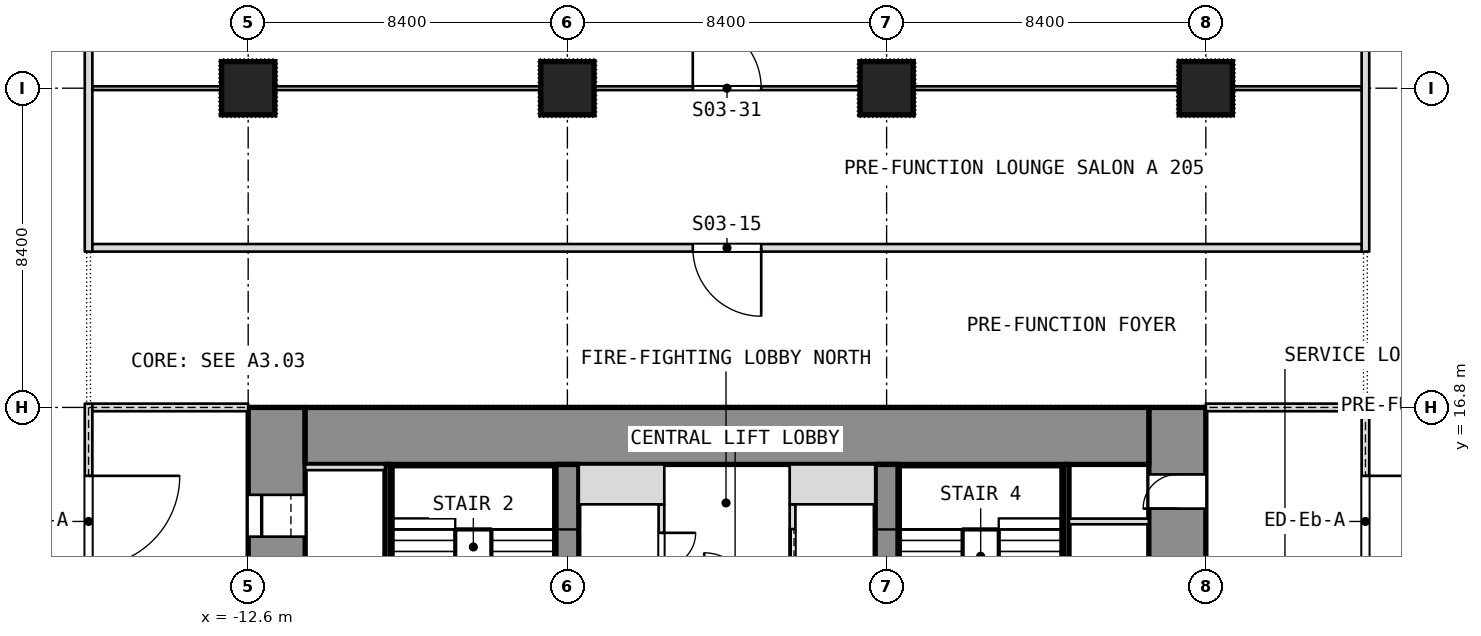
"""IFC4 building model, lengths in metres.
Left out: names, types, materials, properties, quantities, classifications, styles, units other than length and angle.
Written with IfcOpenShell. Run it as: python <this file> out.ifc"""

import sys

from ifc_helpers import new_model, si_unit, direction, frame, frame_2d, origin, origin_2d, place, context, subcontext, project, spatial, rectangle, extrude, element, fill, save


model = new_model("IFC4")
c1 = context("Model", 3, precision=1e-05, world=origin(), true_north=direction((0.0, 1.0)))
c2 = subcontext(c1, "Body", "Model", "MODEL_VIEW")
j1 = project(units=[si_unit("LENGTHUNIT", "METRE"), si_unit("PLANEANGLEUNIT", "RADIAN")], contexts=[c1])
p1 = place(None, origin())
s1 = spatial("IfcSite", under=j1, at=p1, CompositionType="ELEMENT")
p2 = place(p1, origin())
s2 = spatial("IfcBuilding", under=s1, at=p2, CompositionType="ELEMENT")
p3 = place(p2, frame((0.0, 0.0, 13.0)))
s3 = spatial("IfcBuildingStorey", under=s2, at=p3, CompositionType="ELEMENT", Elevation=13.0)
for number, where, z_axis, x_axis in (
    (1, (-12.6, 25.2, 0.0), (0.0, 0.0, 1.0), (1.0, 0.0, 0.0)),
    (2, (-4.2, 25.2, 0.0), (0.0, 0.0, 1.0), (1.0, 0.0, 0.0)),
    (3, (4.2, 25.2, 0.0), (0.0, 0.0, 1.0), (1.0, 0.0, 0.0)),
    (4, (12.6, 25.2, 0.0), (0.0, 0.0, 1.0), (1.0, 0.0, 0.0)),
):
    element("IfcColumn", number, at=place(p3, frame(where, z_axis=z_axis, x_axis=x_axis)), inside=s3, PredefinedType="COLUMN", context=c2, shape_type="SweptSolid", body=[
        extrude(rectangle(XDim=1.4, YDim=1.4, at=origin_2d()), origin(), (0.0, 0.0, 1.0), 8.0),
    ])
p4 = place(p3, frame((11.85, 0.0, 0.0), z_axis=(0.0, 0.0, 1.0), x_axis=(0.0, 1.0, 0.0)))
e5 = element("IfcWall", 5, at=p4, inside=s3, PredefinedType="SHEAR", context=c2, shape_type="SweptSolid", body=[
    extrude(rectangle(XDim=16.8, YDim=1.5, at=frame_2d((8.4, 0.0))), origin(), (0.0, 0.0, 1.0), 8.0),
])
p5 = place(p4, frame((1.762, 0.0, 0.0)))
e6 = element("IfcOpeningElement", 6, at=p5, cuts=e5, PredefinedType="OPENING", context=c2, shape_type="SweptSolid", body=[
    extrude(rectangle(XDim=0.9, YDim=2.1, at=frame_2d((0.45, 1.05))), frame((0.0, 0.75, 0.0), z_axis=(0.0, -1.0, 0.0), x_axis=(1.0, 0.0, 0.0)), (0.0, 0.0, 1.0), 1.5),
])
p6 = place(p4, frame((4.387, 0.0, 0.0)))
e7 = element("IfcOpeningElement", 7, at=p6, cuts=e5, PredefinedType="OPENING", context=c2, shape_type="SweptSolid", body=[
    extrude(rectangle(XDim=0.9, YDim=2.1, at=frame_2d((0.45, 1.05))), frame((0.0, 0.75, 0.0), z_axis=(0.0, -1.0, 0.0), x_axis=(1.0, 0.0, 0.0)), (0.0, 0.0, 1.0), 1.5),
])
p7 = place(p4, frame((6.825, 0.0, 0.0)))
e8 = element("IfcOpeningElement", 8, at=p7, cuts=e5, PredefinedType="OPENING", context=c2, shape_type="SweptSolid", body=[
    extrude(rectangle(XDim=1.2, YDim=2.1, at=frame_2d((0.6, 1.05))), frame((0.0, 0.75, 0.0), z_axis=(0.0, -1.0, 0.0), x_axis=(1.0, 0.0, 0.0)), (0.0, 0.0, 1.0), 1.5),
])
p8 = place(p4, frame((14.137, 0.0, 0.0)))
e9 = element("IfcOpeningElement", 9, at=p8, cuts=e5, PredefinedType="OPENING", context=c2, shape_type="SweptSolid", body=[
    extrude(rectangle(XDim=0.9, YDim=2.1, at=frame_2d((0.45, 1.05))), frame((0.0, 0.75, 0.0), z_axis=(0.0, -1.0, 0.0), x_axis=(1.0, 0.0, 0.0)), (0.0, 0.0, 1.0), 1.5),
])
p9 = place(p4, frame((11.512, 0.0, 0.0)))
e10 = element("IfcOpeningElement", 10, at=p9, cuts=e5, PredefinedType="OPENING", context=c2, shape_type="SweptSolid", body=[
    extrude(rectangle(XDim=0.9, YDim=2.1, at=frame_2d((0.45, 1.05))), frame((0.0, 0.75, 0.0), z_axis=(0.0, -1.0, 0.0), x_axis=(1.0, 0.0, 0.0)), (0.0, 0.0, 1.0), 1.5),
])
p10 = place(p4, frame((8.775, 0.0, 0.0)))
e11 = element("IfcOpeningElement", 11, at=p10, cuts=e5, PredefinedType="OPENING", context=c2, shape_type="SweptSolid", body=[
    extrude(rectangle(XDim=1.2, YDim=2.1, at=frame_2d((0.6, 1.05))), frame((0.0, 0.75, 0.0), z_axis=(0.0, -1.0, 0.0), x_axis=(1.0, 0.0, 0.0)), (0.0, 0.0, 1.0), 1.5),
])
p11 = place(p3, frame((-11.85, 0.0, 0.0), z_axis=(0.0, 0.0, 1.0), x_axis=(0.0, 1.0, 0.0)))
e12 = element("IfcWall", 12, at=p11, inside=s3, PredefinedType="SHEAR", context=c2, shape_type="SweptSolid", body=[
    extrude(rectangle(XDim=16.8, YDim=1.5, at=frame_2d((8.4, 0.0))), origin(), (0.0, 0.0, 1.0), 8.0),
])
p12 = place(p11, frame((2.3, 0.0, 0.0)))
e13 = element("IfcOpeningElement", 13, at=p12, cuts=e12, PredefinedType="OPENING", context=c2, shape_type="SweptSolid", body=[
    extrude(rectangle(XDim=1.1, YDim=2.1, at=frame_2d((0.55, 1.05))), frame((0.0, 0.75, 0.0), z_axis=(0.0, -1.0, 0.0), x_axis=(1.0, 0.0, 0.0)), (0.0, 0.0, 1.0), 1.5),
])
p13 = place(p11, frame((4.85, 0.0, 0.0)))
e14 = element("IfcOpeningElement", 14, at=p13, cuts=e12, PredefinedType="OPENING", context=c2, shape_type="SweptSolid", body=[
    extrude(rectangle(XDim=1.1, YDim=2.1, at=frame_2d((0.55, 1.05))), frame((0.0, 0.75, 0.0), z_axis=(0.0, -1.0, 0.0), x_axis=(1.0, 0.0, 0.0)), (0.0, 0.0, 1.0), 1.5),
])
p14 = place(p11, frame((6.825, 0.0, 0.0)))
e15 = element("IfcOpeningElement", 15, at=p14, cuts=e12, PredefinedType="OPENING", context=c2, shape_type="SweptSolid", body=[
    extrude(rectangle(XDim=1.2, YDim=2.1, at=frame_2d((0.6, 1.05))), frame((0.0, 0.75, 0.0), z_axis=(0.0, -1.0, 0.0), x_axis=(1.0, 0.0, 0.0)), (0.0, 0.0, 1.0), 1.5),
])
p15 = place(p11, frame((13.4, 0.0, 0.0)))
e16 = element("IfcOpeningElement", 16, at=p15, cuts=e12, PredefinedType="OPENING", context=c2, shape_type="SweptSolid", body=[
    extrude(rectangle(XDim=1.1, YDim=2.1, at=frame_2d((0.55, 1.05))), frame((0.0, 0.75, 0.0), z_axis=(0.0, -1.0, 0.0), x_axis=(1.0, 0.0, 0.0)), (0.0, 0.0, 1.0), 1.5),
])
p16 = place(p11, frame((10.85, 0.0, 0.0)))
e17 = element("IfcOpeningElement", 17, at=p16, cuts=e12, PredefinedType="OPENING", context=c2, shape_type="SweptSolid", body=[
    extrude(rectangle(XDim=1.1, YDim=2.1, at=frame_2d((0.55, 1.05))), frame((0.0, 0.75, 0.0), z_axis=(0.0, -1.0, 0.0), x_axis=(1.0, 0.0, 0.0)), (0.0, 0.0, 1.0), 1.5),
])
p17 = place(p11, frame((8.775, 0.0, 0.0)))
e18 = element("IfcOpeningElement", 18, at=p17, cuts=e12, PredefinedType="OPENING", context=c2, shape_type="SweptSolid", body=[
    extrude(rectangle(XDim=1.2, YDim=2.1, at=frame_2d((0.6, 1.05))), frame((0.0, 0.75, 0.0), z_axis=(0.0, -1.0, 0.0), x_axis=(1.0, 0.0, 0.0)), (0.0, 0.0, 1.0), 1.5),
])
p18 = place(p3, frame((-11.1, 16.05, 0.0), z_axis=(0.0, 0.0, 1.0), x_axis=(1.0, 0.0, 0.0)))
e19 = element("IfcWall", 19, at=p18, inside=s3, PredefinedType="SHEAR", context=c2, shape_type="SweptSolid", body=[
    extrude(rectangle(XDim=22.2, YDim=1.5, at=frame_2d((11.1, 0.0))), origin(), (0.0, 0.0, 1.0), 8.0),
])
p19 = place(p3, frame((-4.2, 1.5, 0.0), z_axis=(0.0, 0.0, 1.0), x_axis=(0.0, 1.0, 0.0)))
e20 = element("IfcWall", 20, at=p19, inside=s3, PredefinedType="SHEAR", context=c2, shape_type="SweptSolid", body=[
    extrude(rectangle(XDim=13.8, YDim=0.6, at=frame_2d((6.9, 0.0))), origin(), (0.0, 0.0, 1.0), 8.0),
])
p20 = place(p19, frame((7.8, 0.0, 0.0)))
e21 = element("IfcOpeningElement", 21, at=p20, cuts=e20, PredefinedType="OPENING", context=c2, shape_type="SweptSolid", body=[
    extrude(rectangle(XDim=1.2, YDim=2.1, at=frame_2d((0.6, 1.05))), frame((0.0, 0.3, 0.0), z_axis=(0.0, -1.0, 0.0), x_axis=(1.0, 0.0, 0.0)), (0.0, 0.0, 1.0), 0.6),
])
p21 = place(p3, frame((4.2, 1.5, 0.0), z_axis=(0.0, 0.0, 1.0), x_axis=(0.0, 1.0, 0.0)))
e22 = element("IfcWall", 22, at=p21, inside=s3, PredefinedType="SHEAR", context=c2, shape_type="SweptSolid", body=[
    extrude(rectangle(XDim=13.8, YDim=0.6, at=frame_2d((6.9, 0.0))), origin(), (0.0, 0.0, 1.0), 8.0),
])
p22 = place(p21, frame((5.25, 0.0, 0.0)))
e23 = element("IfcOpeningElement", 23, at=p22, cuts=e22, PredefinedType="OPENING", context=c2, shape_type="SweptSolid", body=[
    extrude(rectangle(XDim=1.2, YDim=2.1, at=frame_2d((0.6, 1.05))), frame((0.0, 0.3, 0.0), z_axis=(0.0, -1.0, 0.0), x_axis=(1.0, 0.0, 0.0)), (0.0, 0.0, 1.0), 0.6),
])
p23 = place(p3, frame((16.8, 20.9, 0.0), z_axis=(0.0, 0.0, 1.0), x_axis=(0.0, 1.0, 0.0)))
e24 = element("IfcWall", 24, at=p23, inside=s3, PredefinedType="PARTITIONING", context=c2, shape_type="SweptSolid", body=[
    extrude(rectangle(XDim=15.0, YDim=0.2, at=frame_2d((7.5, 0.0))), origin(), (0.0, 0.0, 1.0), 7.68),
])
p24 = place(p3, frame((-16.8, 20.9, 0.0), z_axis=(0.0, 0.0, 1.0), x_axis=(0.0, 1.0, 0.0)))
e25 = element("IfcWall", 25, at=p24, inside=s3, PredefinedType="PARTITIONING", context=c2, shape_type="SweptSolid", body=[
    extrude(rectangle(XDim=13.8, YDim=0.2, at=frame_2d((6.9, 0.0))), origin(), (0.0, 0.0, 1.0), 7.68),
])
p25 = place(p3, frame((-16.7, 21.0, 0.0), z_axis=(0.0, 0.0, 1.0), x_axis=(1.0, 0.0, 0.0)))
e26 = element("IfcWall", 26, at=p25, inside=s3, PredefinedType="PARTITIONING", context=c2, shape_type="SweptSolid", body=[
    extrude(rectangle(XDim=33.4, YDim=0.2, at=frame_2d((16.7, 0.0))), origin(), (0.0, 0.0, 1.0), 7.68),
])
p26 = place(p25, frame((15.8, 0.0, 0.0)))
e27 = element("IfcOpeningElement", 27, at=p26, cuts=e26, PredefinedType="OPENING", context=c2, shape_type="SweptSolid", body=[
    extrude(rectangle(XDim=1.8, YDim=2.1, at=frame_2d((0.9, 1.05))), frame((0.0, 0.1, 0.0), z_axis=(0.0, -1.0, 0.0), x_axis=(1.0, 0.0, 0.0)), (0.0, 0.0, 1.0), 0.2),
])
p27 = place(p3, frame((-16.7, 25.2, 0.0), z_axis=(0.0, 0.0, 1.0), x_axis=(1.0, 0.0, 0.0)))
e28 = element("IfcWall", 28, at=p27, inside=s3, PredefinedType="PARTITIONING", context=c2, shape_type="SweptSolid", body=[
    extrude(rectangle(XDim=3.38, YDim=0.1, at=frame_2d((1.69, 0.0))), origin(), (0.0, 0.0, 1.0), 7.68),
])
p28 = place(p3, frame((-11.88, 25.2, 0.0), z_axis=(0.0, 0.0, 1.0), x_axis=(1.0, 0.0, 0.0)))
e29 = element("IfcWall", 29, at=p28, inside=s3, PredefinedType="PARTITIONING", context=c2, shape_type="SweptSolid", body=[
    extrude(rectangle(XDim=6.96, YDim=0.1, at=frame_2d((3.48, 0.0))), origin(), (0.0, 0.0, 1.0), 7.68),
])
p29 = place(p3, frame((-3.48, 25.2, 0.0), z_axis=(0.0, 0.0, 1.0), x_axis=(1.0, 0.0, 0.0)))
e30 = element("IfcWall", 30, at=p29, inside=s3, PredefinedType="PARTITIONING", context=c2, shape_type="SweptSolid", body=[
    extrude(rectangle(XDim=6.96, YDim=0.1, at=frame_2d((3.48, 0.0))), origin(), (0.0, 0.0, 1.0), 7.68),
])
p30 = place(p29, frame((2.58, 0.0, 0.0)))
e31 = element("IfcOpeningElement", 31, at=p30, cuts=e30, PredefinedType="OPENING", context=c2, shape_type="SweptSolid", body=[
    extrude(rectangle(XDim=1.8, YDim=2.1, at=frame_2d((0.9, 1.05))), frame((0.0, 0.05, 0.0), z_axis=(0.0, -1.0, 0.0), x_axis=(1.0, 0.0, 0.0)), (0.0, 0.0, 1.0), 0.1),
])
p31 = place(p3, frame((4.92, 25.2, 0.0), z_axis=(0.0, 0.0, 1.0), x_axis=(1.0, 0.0, 0.0)))
e32 = element("IfcWall", 32, at=p31, inside=s3, PredefinedType="PARTITIONING", context=c2, shape_type="SweptSolid", body=[
    extrude(rectangle(XDim=6.96, YDim=0.1, at=frame_2d((3.48, 0.0))), origin(), (0.0, 0.0, 1.0), 7.68),
])
p32 = place(p3, frame((13.32, 25.2, 0.0), z_axis=(0.0, 0.0, 1.0), x_axis=(1.0, 0.0, 0.0)))
e33 = element("IfcWall", 33, at=p32, inside=s3, PredefinedType="PARTITIONING", context=c2, shape_type="SweptSolid", body=[
    extrude(rectangle(XDim=3.38, YDim=0.1, at=frame_2d((1.69, 0.0))), origin(), (0.0, 0.0, 1.0), 7.68),
])
p33 = place(p3, frame((-8.925, 8.7, 0.0), z_axis=(0.0, 0.0, 1.0), x_axis=(0.0, 1.0, 0.0)))
e34 = element("IfcWall", 34, at=p33, inside=s3, PredefinedType="SHEAR", context=c2, shape_type="SweptSolid", body=[
    extrude(rectangle(XDim=6.6, YDim=0.15, at=frame_2d((3.3, 0.0))), origin(), (0.0, 0.0, 1.0), 7.78),
])
p34 = place(p33, frame((0.075, 0.0, 0.0)))
e35 = element("IfcOpeningElement", 35, at=p34, cuts=e34, PredefinedType="OPENING", context=c2, shape_type="SweptSolid", body=[
    extrude(rectangle(XDim=1.2, YDim=2.1, at=frame_2d((0.6, 1.05))), frame((0.0, 0.075, 0.0), z_axis=(0.0, -1.0, 0.0), x_axis=(1.0, 0.0, 0.0)), (0.0, 0.0, 1.0), 0.15),
])
p35 = place(p3, frame((-11.1, 15.225, 0.0), z_axis=(0.0, 0.0, 1.0), x_axis=(1.0, 0.0, 0.0)))
e36 = element("IfcWall", 36, at=p35, inside=s3, PredefinedType="SHEAR", context=c2, shape_type="SweptSolid", body=[
    extrude(rectangle(XDim=2.1, YDim=0.15, at=frame_2d((1.05, 0.0))), origin(), (0.0, 0.0, 1.0), 8.0),
])
p36 = place(p3, frame((8.925, 8.7, 0.0), z_axis=(0.0, 0.0, 1.0), x_axis=(0.0, 1.0, 0.0)))
e37 = element("IfcWall", 37, at=p36, inside=s3, PredefinedType="SHEAR", context=c2, shape_type="SweptSolid", body=[
    extrude(rectangle(XDim=6.6, YDim=0.15, at=frame_2d((3.3, 0.0))), origin(), (0.0, 0.0, 1.0), 7.78),
])
p37 = place(p36, frame((0.075, 0.0, 0.0)))
e38 = element("IfcOpeningElement", 38, at=p37, cuts=e37, PredefinedType="OPENING", context=c2, shape_type="SweptSolid", body=[
    extrude(rectangle(XDim=1.2, YDim=2.1, at=frame_2d((0.6, 1.05))), frame((0.0, 0.075, 0.0), z_axis=(0.0, -1.0, 0.0), x_axis=(1.0, 0.0, 0.0)), (0.0, 0.0, 1.0), 0.15),
])
p38 = place(p3, frame((9.0, 13.8, 0.0), z_axis=(0.0, 0.0, 1.0), x_axis=(1.0, 0.0, 0.0)))
e39 = element("IfcWall", 39, at=p38, inside=s3, PredefinedType="PARTITIONING", context=c2, shape_type="SweptSolid", body=[
    extrude(rectangle(XDim=2.1, YDim=0.15, at=frame_2d((1.05, 0.0))), origin(), (0.0, 0.0, 1.0), 7.78),
])
p39 = place(p3, frame((-1.725, 11.85, 0.0), z_axis=(0.0, 0.0, 1.0), x_axis=(0.0, 1.0, 0.0)))
e40 = element("IfcWall", 40, at=p39, inside=s3, PredefinedType="PARTITIONING", context=c2, shape_type="SweptSolid", body=[
    extrude(rectangle(XDim=2.4, YDim=0.15, at=frame_2d((1.2, 0.0))), origin(), (0.0, 0.0, 1.0), 7.78),
])
p40 = place(p39, frame((0.75, 0.0, 0.0)))
e41 = element("IfcOpeningElement", 41, at=p40, cuts=e40, PredefinedType="OPENING", context=c2, shape_type="SweptSolid", body=[
    extrude(rectangle(XDim=0.9, YDim=2.1, at=frame_2d((0.45, 1.05))), frame((0.0, 0.075, 0.0), z_axis=(0.0, -1.0, 0.0), x_axis=(1.0, 0.0, 0.0)), (0.0, 0.0, 1.0), 0.15),
])
p41 = place(p3, frame((-3.9, 14.775, 0.0), z_axis=(0.0, 0.0, 1.0), x_axis=(1.0, 0.0, 0.0)))
e42 = element("IfcWall", 42, at=p41, inside=s3, PredefinedType="PARTITIONING", context=c2, shape_type="SweptSolid", body=[
    extrude(rectangle(XDim=2.25, YDim=1.05, at=frame_2d((1.125, 0.0))), origin(), (0.0, 0.0, 1.0), 7.78),
])
p42 = place(p3, frame((1.725, 11.85, 0.0), z_axis=(0.0, 0.0, 1.0), x_axis=(0.0, 1.0, 0.0)))
e43 = element("IfcWall", 43, at=p42, inside=s3, PredefinedType="SHEAR", context=c2, shape_type="SweptSolid", body=[
    extrude(rectangle(XDim=2.4, YDim=0.15, at=frame_2d((1.2, 0.0))), origin(), (0.0, 0.0, 1.0), 8.0),
])
p43 = place(p42, frame((0.65, 0.0, 0.0)))
e44 = element("IfcOpeningElement", 44, at=p43, cuts=e43, PredefinedType="OPENING", context=c2, shape_type="SweptSolid", body=[
    extrude(rectangle(XDim=1.1, YDim=2.1, at=frame_2d((0.55, 1.05))), frame((0.0, 0.075, 0.0), z_axis=(0.0, -1.0, 0.0), x_axis=(1.0, 0.0, 0.0)), (0.0, 0.0, 1.0), 0.15),
])
p44 = place(p3, frame((1.65, 14.775, 0.0), z_axis=(0.0, 0.0, 1.0), x_axis=(1.0, 0.0, 0.0)))
e45 = element("IfcWall", 45, at=p44, inside=s3, PredefinedType="SHEAR", context=c2, shape_type="SweptSolid", body=[
    extrude(rectangle(XDim=2.25, YDim=1.05, at=frame_2d((1.125, 0.0))), origin(), (0.0, 0.0, 1.0), 8.0),
])
p45 = place(p3, frame((-16.8, -0.1, 0.0), z_axis=(0.0, 0.0, 1.0), x_axis=(0.0, 1.0, 0.0)))
e46 = element("IfcWall", 46, at=p45, inside=s3, PredefinedType="PARTITIONING", context=c2, shape_type="SweptSolid", body=[
    extrude(rectangle(XDim=17.0, YDim=0.2, at=frame_2d((8.5, 0.0))), origin(), (0.0, 0.0, 1.0), 7.78),
])
p46 = place(p45, frame((1.9, 0.0, 0.0)))
e47 = element("IfcOpeningElement", 47, at=p46, cuts=e46, PredefinedType="OPENING", context=c2, shape_type="SweptSolid", body=[
    extrude(rectangle(XDim=2.4, YDim=2.1, at=frame_2d((1.2, 1.05))), frame((0.0, 0.1, 0.0), z_axis=(0.0, -1.0, 0.0), x_axis=(1.0, 0.0, 0.0)), (0.0, 0.0, 1.0), 0.2),
])
p47 = place(p45, frame((12.7, 0.0, 0.0)))
e48 = element("IfcOpeningElement", 48, at=p47, cuts=e46, PredefinedType="OPENING", context=c2, shape_type="SweptSolid", body=[
    extrude(rectangle(XDim=2.4, YDim=2.1, at=frame_2d((1.2, 1.05))), frame((0.0, 0.1, 0.0), z_axis=(0.0, -1.0, 0.0), x_axis=(1.0, 0.0, 0.0)), (0.0, 0.0, 1.0), 0.2),
])
p48 = place(p3, frame((-16.7, 16.8, 0.0), z_axis=(0.0, 0.0, 1.0), x_axis=(1.0, 0.0, 0.0)))
e49 = element("IfcWall", 49, at=p48, inside=s3, PredefinedType="PARTITIONING", context=c2, shape_type="SweptSolid", body=[
    extrude(rectangle(XDim=4.1, YDim=0.2, at=frame_2d((2.05, 0.0))), origin(), (0.0, 0.0, 1.0), 7.78),
])
p49 = place(p3, frame((16.8, -0.1, 0.0), z_axis=(0.0, 0.0, 1.0), x_axis=(0.0, 1.0, 0.0)))
e50 = element("IfcWall", 50, at=p49, inside=s3, PredefinedType="PARTITIONING", context=c2, shape_type="SweptSolid", body=[
    extrude(rectangle(XDim=17.0, YDim=0.2, at=frame_2d((8.5, 0.0))), origin(), (0.0, 0.0, 1.0), 7.78),
])
p50 = place(p49, frame((1.9, 0.0, 0.0)))
e51 = element("IfcOpeningElement", 51, at=p50, cuts=e50, PredefinedType="OPENING", context=c2, shape_type="SweptSolid", body=[
    extrude(rectangle(XDim=2.4, YDim=2.1, at=frame_2d((1.2, 1.05))), frame((0.0, 0.1, 0.0), z_axis=(0.0, -1.0, 0.0), x_axis=(1.0, 0.0, 0.0)), (0.0, 0.0, 1.0), 0.2),
])
p51 = place(p49, frame((12.7, 0.0, 0.0)))
e52 = element("IfcOpeningElement", 52, at=p51, cuts=e50, PredefinedType="OPENING", context=c2, shape_type="SweptSolid", body=[
    extrude(rectangle(XDim=2.4, YDim=2.1, at=frame_2d((1.2, 1.05))), frame((0.0, 0.1, 0.0), z_axis=(0.0, -1.0, 0.0), x_axis=(1.0, 0.0, 0.0)), (0.0, 0.0, 1.0), 0.2),
])
p52 = place(p3, frame((12.6, 16.8, 0.0), z_axis=(0.0, 0.0, 1.0), x_axis=(1.0, 0.0, 0.0)))
e53 = element("IfcWall", 53, at=p52, inside=s3, PredefinedType="PARTITIONING", context=c2, shape_type="SweptSolid", body=[
    extrude(rectangle(XDim=4.1, YDim=0.2, at=frame_2d((2.05, 0.0))), origin(), (0.0, 0.0, 1.0), 7.78),
])
p53 = place(p26, origin())
e54 = element("IfcDoor", 54, at=p53, inside=s3, OperationType="DOUBLE_DOOR_SINGLE_SWING", PredefinedType="DOOR", context=c2, shape_type="SweptSolid", body=[
    extrude(rectangle(XDim=1.8, YDim=2.1, at=frame_2d((0.9, 1.05))), frame((0.0, 0.025, 0.0), z_axis=(0.0, -1.0, 0.0), x_axis=(1.0, 0.0, 0.0)), (0.0, 0.0, 1.0), 0.05),
])
fill(e27, e54)
p54 = place(p30, origin())
e55 = element("IfcDoor", 55, at=p54, inside=s3, OperationType="DOUBLE_DOOR_SINGLE_SWING", PredefinedType="DOOR", context=c2, shape_type="SweptSolid", body=[
    extrude(rectangle(XDim=1.8, YDim=2.1, at=frame_2d((0.9, 1.05))), frame((0.0, 0.025, 0.0), z_axis=(0.0, -1.0, 0.0), x_axis=(1.0, 0.0, 0.0)), (0.0, 0.0, 1.0), 0.05),
])
fill(e31, e55)
p55 = place(p15, origin())
e56 = element("IfcDoor", 56, at=p55, inside=s3, OperationType="SLIDING_TO_LEFT", PredefinedType="DOOR", context=c2, shape_type="SweptSolid", body=[
    extrude(rectangle(XDim=1.1, YDim=2.1, at=frame_2d((0.55, 1.05))), frame((0.0, 0.025, 0.0), z_axis=(0.0, -1.0, 0.0), x_axis=(1.0, 0.0, 0.0)), (0.0, 0.0, 1.0), 0.05),
])
fill(e16, e56)
p56 = place(p8, origin())
e57 = element("IfcDoor", 57, at=p56, inside=s3, OperationType="SINGLE_SWING_LEFT", PredefinedType="DOOR", context=c2, shape_type="SweptSolid", body=[
    extrude(rectangle(XDim=0.9, YDim=2.1, at=frame_2d((0.45, 1.05))), frame((0.0, 0.025, 0.0), z_axis=(0.0, -1.0, 0.0), x_axis=(1.0, 0.0, 0.0)), (0.0, 0.0, 1.0), 0.05),
])
fill(e9, e57)
p57 = place(p43, origin())
e58 = element("IfcDoor", 58, at=p57, inside=s3, OperationType="SLIDING_TO_LEFT", PredefinedType="DOOR", context=c2, shape_type="SweptSolid", body=[
    extrude(rectangle(XDim=1.1, YDim=2.1, at=frame_2d((0.55, 1.05))), frame((0.0, 0.025, 0.0), z_axis=(0.0, -1.0, 0.0), x_axis=(1.0, 0.0, 0.0)), (0.0, 0.0, 1.0), 0.05),
])
fill(e44, e58)
p58 = place(p40, origin())
e59 = element("IfcDoor", 59, at=p58, inside=s3, OperationType="SINGLE_SWING_LEFT", PredefinedType="DOOR", context=c2, shape_type="SweptSolid", body=[
    extrude(rectangle(XDim=0.9, YDim=2.1, at=frame_2d((0.45, 1.05))), frame((0.0, 0.025, 0.0), z_axis=(0.0, -1.0, 0.0), x_axis=(1.0, 0.0, 0.0)), (0.0, 0.0, 1.0), 0.05),
])
fill(e41, e59)
p59 = place(p47, origin())
e60 = element("IfcDoor", 60, at=p59, inside=s3, OperationType="DOUBLE_DOOR_SINGLE_SWING", PredefinedType="DOOR", context=c2, shape_type="SweptSolid", body=[
    extrude(rectangle(XDim=2.4, YDim=2.1, at=frame_2d((1.2, 1.05))), frame((0.0, 0.025, 0.0), z_axis=(0.0, -1.0, 0.0), x_axis=(1.0, 0.0, 0.0)), (0.0, 0.0, 1.0), 0.05),
])
fill(e48, e60)
p60 = place(p51, origin())
e61 = element("IfcDoor", 61, at=p60, inside=s3, OperationType="DOUBLE_DOOR_SINGLE_SWING", PredefinedType="DOOR", context=c2, shape_type="SweptSolid", body=[
    extrude(rectangle(XDim=2.4, YDim=2.1, at=frame_2d((1.2, 1.05))), frame((0.0, 0.025, 0.0), z_axis=(0.0, -1.0, 0.0), x_axis=(1.0, 0.0, 0.0)), (0.0, 0.0, 1.0), 0.05),
])
fill(e52, e61)
save(model, sys.argv[1])
